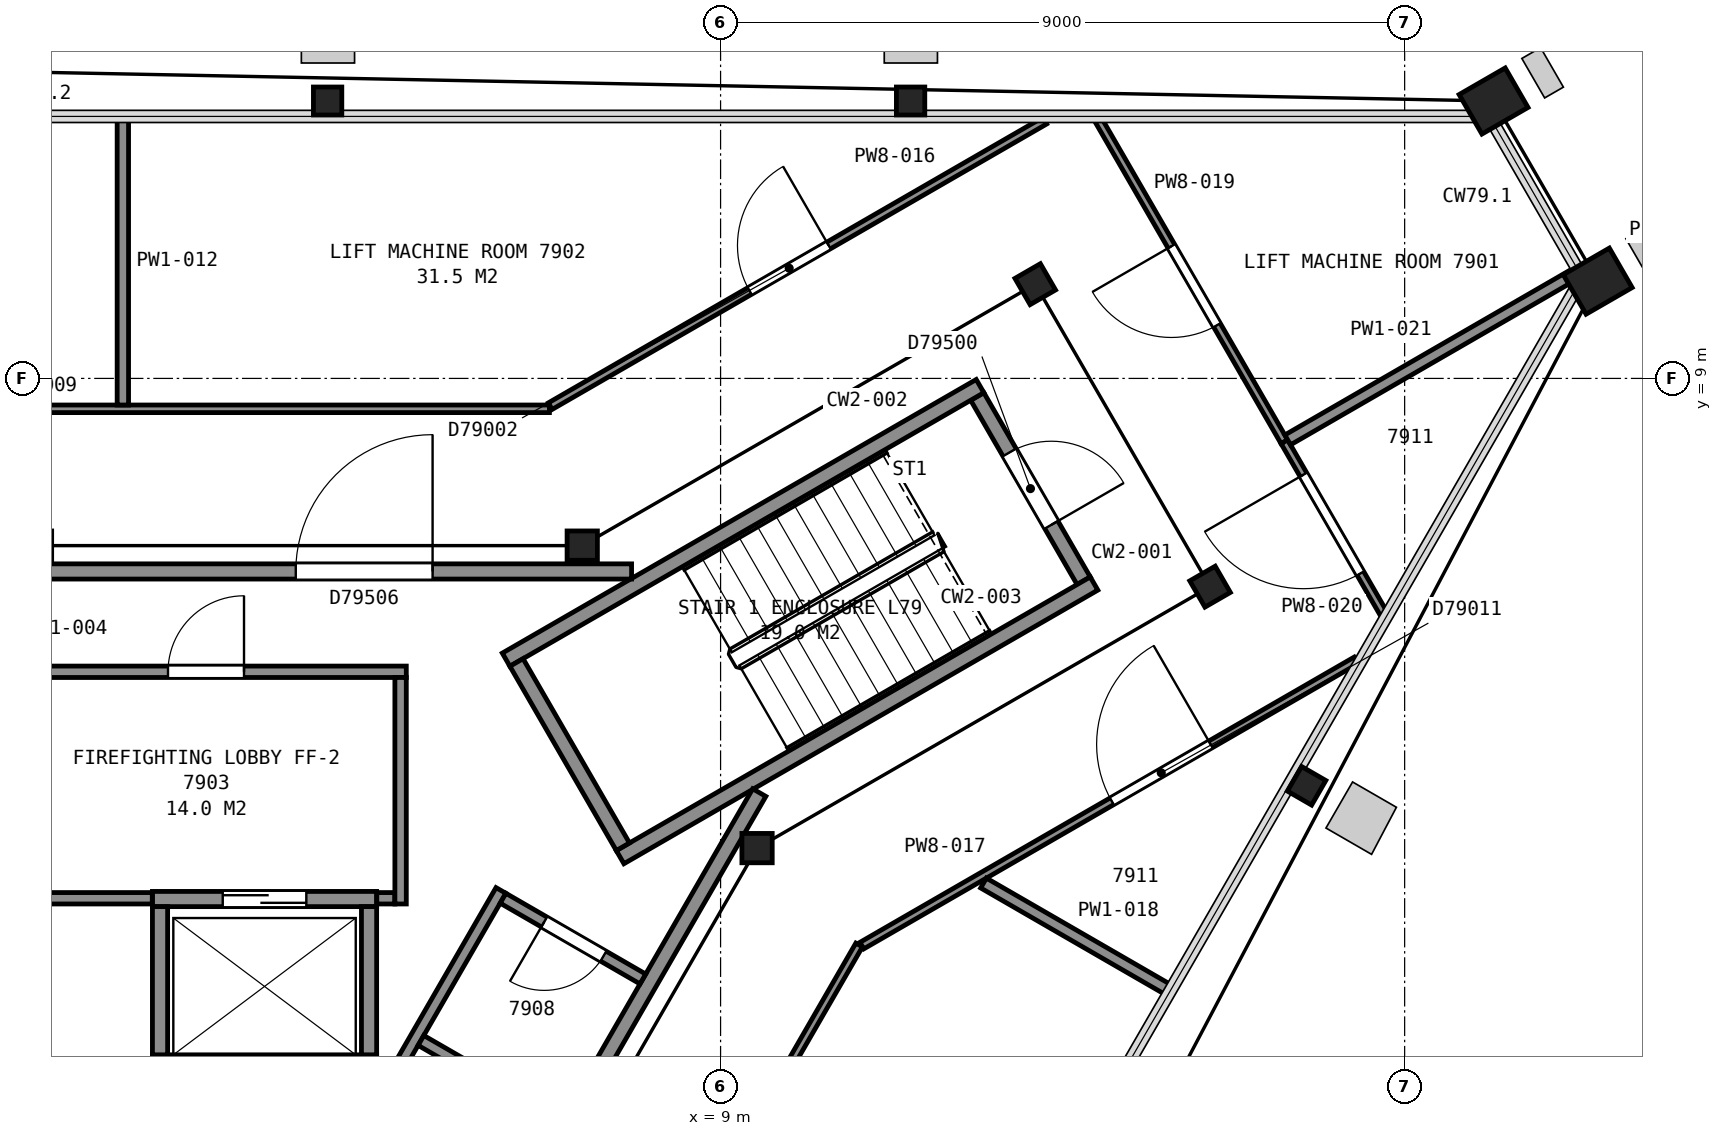
"""IFC4 building model, lengths in metres.
Left out: names, types, materials, properties, quantities, classifications, styles, units other than length and angle.
Written with IfcOpenShell. Run it as: python <this file> out.ifc"""

import sys

from ifc_helpers import new_model, si_unit, direction, frame, frame_2d, origin, origin_2d, place, context, subcontext, project, spatial, rectangle, hollow_rectangle, i_section, extrude, element, fill, save


model = new_model("IFC4")
c1 = context("Model", 3, precision=1e-05, world=origin(), true_north=direction((0.0, 1.0)))
c2 = subcontext(c1, "Body", "Model", "MODEL_VIEW")
j1 = project(units=[si_unit("LENGTHUNIT", "METRE"), si_unit("PLANEANGLEUNIT", "RADIAN")], contexts=[c1])
p1 = place(None, origin())
s1 = spatial("IfcSite", under=j1, at=p1, CompositionType="ELEMENT")
p2 = place(p1, origin())
s2 = spatial("IfcBuilding", under=s1, at=p2, CompositionType="ELEMENT")
p3 = place(p2, frame((0.0, 0.0, 312.6)))
s3 = spatial("IfcBuildingStorey", under=s2, at=p3, CompositionType="ELEMENT", Elevation=312.6)
p4 = place(p3, frame((19.17, 12.65, 0.0), z_axis=(0.0, 0.0, 1.0), x_axis=(0.5, -0.866025403784, 0.0)))
e1 = element("IfcColumn", 1, at=p4, inside=s3, PredefinedType="COLUMN", context=c2, shape_type="SweptSolid", body=[
    extrude(hollow_rectangle(XDim=0.6, YDim=0.7, WallThickness=0.04, at=origin_2d()), origin(), (0.0, 0.0, 1.0), 4.2),
])
for number, where, z_axis, x_axis in (
    (2, (11.5, 12.65, 0.0), (0.0, 0.0, 1.0), (1.0, 0.0, 0.0)),
    (3, (3.83, 12.65, 0.0), (0.0, 0.0, 1.0), (1.0, 0.0, 0.0)),
    (4, (16.71, 3.64, 0.0), (0.0, 0.0, 1.0), (-0.5, -0.866, 0.0)),
):
    element("IfcColumn", number, at=place(p3, frame(where, z_axis=z_axis, x_axis=x_axis)), inside=s3, PredefinedType="COLUMN", context=c2, shape_type="SweptSolid", body=[
        extrude(i_section(OverallWidth=0.373, OverallDepth=0.368, WebThickness=0.015, FlangeThickness=0.024, FilletRadius=0.015, at=origin_2d()), origin(), (0.0, 0.0, 1.0), 4.2),
    ])
p5 = place(p3, frame((20.54, 10.28, 0.0), z_axis=(0.0, 0.0, 1.0), x_axis=(0.5, -0.866025403784, 0.0)))
e5 = element("IfcColumn", 5, at=p5, inside=s3, PredefinedType="COLUMN", context=c2, shape_type="SweptSolid", body=[
    extrude(hollow_rectangle(XDim=0.6, YDim=0.7, WallThickness=0.04, at=origin_2d()), origin(), (0.0, 0.0, 1.0), 4.2),
])
for number, where, z_axis, x_axis in (
    (6, (9.48, 2.82, 0.0), (0.0, 0.0, 1.0), (1.0, 0.0, 0.0)),
    (7, (15.44, 6.26, 0.0), (0.0, 0.0, 1.0), (0.5, -0.866, 0.0)),
    (8, (13.14, 10.24, 0.0), (0.0, 0.0, 1.0), (0.5, -0.866, 0.0)),
    (9, (7.18, 6.8, 0.0), (0.0, 0.0, 1.0), (1.0, 0.0, 0.0)),
):
    element("IfcColumn", number, at=place(p3, frame(where, z_axis=z_axis, x_axis=x_axis)), inside=s3, PredefinedType="COLUMN", context=c2, shape_type="SweptSolid", body=[
        extrude(i_section(OverallWidth=0.399, OverallDepth=0.386, WebThickness=0.021, FlangeThickness=0.033, FilletRadius=0.015, at=origin_2d()), origin(), (0.0, 0.0, 1.0), 4.2),
    ])
p6 = place(p3, frame((13.777, 6.338, 0.0), z_axis=(0.0, 0.0, 1.0), x_axis=(-0.500049511043, 0.865996816683, 0.0)))
e10 = element("IfcWall", 10, at=p6, inside=s3, PredefinedType="PARTITIONING", context=c2, shape_type="SweptSolid", body=[
    extrude(rectangle(XDim=2.8, YDim=0.2, at=frame_2d((1.4, 0.0))), origin(), (0.0, 0.0, 1.0), 3.95),
])
p7 = place(p6, frame((0.85, 0.0, 0.0)))
e11 = element("IfcOpeningElement", 11, at=p7, cuts=e10, PredefinedType="OPENING", context=c2, shape_type="SweptSolid", body=[
    extrude(rectangle(XDim=1.1, YDim=2.1, at=frame_2d((0.55, 1.05))), frame((0.0, 0.11, 0.0), z_axis=(0.0, -1.0, 0.0), x_axis=(1.0, 0.0, 0.0)), (0.0, 0.0, 1.0), 0.22),
])
for number, where, z_axis, x_axis in (
    (12, (6.178, 5.299, 0.0), (0.0, 0.0, 1.0), (0.866, 0.5, 0.0)),
    (13, (7.678, 2.701, 0.0), (0.0, 0.0, 1.0), (0.866, 0.5, 0.0)),
):
    element("IfcWall", number, at=place(p3, frame(where, z_axis=z_axis, x_axis=x_axis)), inside=s3, PredefinedType="PARTITIONING", context=c2, shape_type="SweptSolid", body=[
        extrude(rectangle(XDim=7.2, YDim=0.2, at=frame_2d((3.6, 0.0))), origin(), (0.0, 0.0, 1.0), 3.95),
    ])
p8 = place(p3, frame((7.715, 2.838, 0.0), z_axis=(0.0, 0.0, 1.0), x_axis=(-0.500049511043, 0.865996816683, 0.0)))
e14 = element("IfcWall", 14, at=p8, inside=s3, PredefinedType="PARTITIONING", context=c2, shape_type="SweptSolid", body=[
    extrude(rectangle(XDim=2.8, YDim=0.2, at=frame_2d((1.4, 0.0))), origin(), (0.0, 0.0, 1.0), 3.95),
])
p9 = place(p3, frame((1.525, 0.0, 0.0), z_axis=(0.0, 0.0, 1.0), x_axis=(1.0, 0.0, 0.0)))
e15 = element("IfcWall", 15, at=p9, inside=s3, PredefinedType="PARTITIONING", context=c2, shape_type="SweptSolid", body=[
    extrude(rectangle(XDim=2.95, YDim=0.2, at=frame_2d((1.475, 0.0))), origin(), (0.0, 0.0, 1.0), 4.2),
])
p10 = place(p3, frame((1.525, 2.15, 0.0), z_axis=(0.0, 0.0, 1.0), x_axis=(1.0, 0.0, 0.0)))
e16 = element("IfcWall", 16, at=p10, inside=s3, PredefinedType="PARTITIONING", context=c2, shape_type="SweptSolid", body=[
    extrude(rectangle(XDim=2.95, YDim=0.2, at=frame_2d((1.475, 0.0))), origin(), (0.0, 0.0, 1.0), 4.2),
])
p11 = place(p10, frame((0.925, 0.0, 0.0)))
e17 = element("IfcOpeningElement", 17, at=p11, cuts=e16, PredefinedType="OPENING", context=c2, shape_type="SweptSolid", body=[
    extrude(rectangle(XDim=1.1, YDim=2.1, at=frame_2d((0.55, 1.05))), frame((0.0, 0.11, 0.0), z_axis=(0.0, -1.0, 0.0), x_axis=(1.0, 0.0, 0.0)), (0.0, 0.0, 1.0), 0.22),
])
for number, where, z_axis, x_axis in (
    (18, (4.375, 0.1, 0.0), (0.0, 0.0, 1.0), (0.0, 1.0, 0.0)),
    (19, (1.625, 0.1, 0.0), (0.0, 0.0, 1.0), (0.0, 1.0, 0.0)),
):
    element("IfcWall", number, at=place(p3, frame(where, z_axis=z_axis, x_axis=x_axis)), inside=s3, PredefinedType="PARTITIONING", context=c2, shape_type="SweptSolid", body=[
        extrude(rectangle(XDim=1.95, YDim=0.2, at=frame_2d((0.975, 0.0))), origin(), (0.0, 0.0, 1.0), 4.2),
    ])
p12 = place(p3, frame((7.829, 6.46, 0.0), z_axis=(0.0, 0.0, 1.0), x_axis=(-1.0, 0.0, 0.0)))
e20 = element("IfcWall", 20, at=p12, inside=s3, PredefinedType="PARTITIONING", context=c2, shape_type="SweptSolid", body=[
    extrude(rectangle(XDim=15.658, YDim=0.2, at=frame_2d((7.829, 0.0))), origin(), (0.0, 0.0, 1.0), 3.95),
])
p13 = place(p12, frame((2.618, 0.0, 0.0)))
e21 = element("IfcOpeningElement", 21, at=p13, cuts=e20, PredefinedType="OPENING", context=c2, shape_type="SweptSolid", body=[
    extrude(rectangle(XDim=1.8, YDim=2.1, at=frame_2d((0.9, 1.05))), frame((0.0, 0.11, 0.0), z_axis=(0.0, -1.0, 0.0), x_axis=(1.0, 0.0, 0.0)), (0.0, 0.0, 1.0), 0.22),
])
p14 = place(p3, frame((-0.245, 5.14, 0.0), z_axis=(0.0, 0.0, 1.0), x_axis=(1.0, 0.0, 0.0)))
e22 = element("IfcWall", 22, at=p14, inside=s3, PredefinedType="PARTITIONING", context=c2, shape_type="SweptSolid", body=[
    extrude(rectangle(XDim=5.11, YDim=0.15, at=frame_2d((2.555, 0.0))), origin(), (0.0, 0.0, 1.0), 3.95),
])
p15 = place(p14, frame((1.975, 0.0, 0.0)))
e23 = element("IfcOpeningElement", 23, at=p15, cuts=e22, PredefinedType="OPENING", context=c2, shape_type="SweptSolid", body=[
    extrude(rectangle(XDim=1.0, YDim=2.1, at=frame_2d((0.5, 1.05))), frame((0.0, 0.085, 0.0), z_axis=(0.0, -1.0, 0.0), x_axis=(1.0, 0.0, 0.0)), (0.0, 0.0, 1.0), 0.17),
])
p16 = place(p3, frame((0.167, 2.16, 0.0), z_axis=(0.0, 0.0, 1.0), x_axis=(1.0, 0.0, 0.0)))
e24 = element("IfcWall", 24, at=p16, inside=s3, PredefinedType="PARTITIONING", context=c2, shape_type="SweptSolid", body=[
    extrude(rectangle(XDim=1.356, YDim=0.15, at=frame_2d((0.678, 0.0))), origin(), (0.0, 0.0, 1.0), 3.95),
])
p17 = place(p3, frame((2.552, -8.5, 0.0), z_axis=(0.0, 0.0, 1.0), x_axis=(0.499981156672, 0.866036282712, 0.0)))
e25 = element("IfcWall", 25, at=p17, inside=s3, PredefinedType="PARTITIONING", context=c2, shape_type="SweptSolid", body=[
    extrude(rectangle(XDim=13.915, YDim=0.2, at=frame_2d((6.957, 0.0))), origin(), (0.0, 0.0, 1.0), 3.95),
])
p18 = place(p3, frame((6.111, 2.263, 0.0), z_axis=(0.0, 0.0, 1.0), x_axis=(-0.500011342071, -0.866018855338, 0.0)))
e26 = element("IfcWall", 26, at=p18, inside=s3, PredefinedType="PARTITIONING", context=c2, shape_type="SweptSolid", body=[
    extrude(rectangle(XDim=4.95, YDim=0.15, at=frame_2d((2.475, 0.0))), origin(), (0.0, 0.0, 1.0), 3.95),
])
p19 = place(p18, frame((3.275, 0.0, 0.0)))
e27 = element("IfcOpeningElement", 27, at=p19, cuts=e26, PredefinedType="OPENING", context=c2, shape_type="SweptSolid", body=[
    extrude(rectangle(XDim=0.9, YDim=2.1, at=frame_2d((0.45, 1.05))), frame((0.0, 0.085, 0.0), z_axis=(0.0, -1.0, 0.0), x_axis=(1.0, 0.0, 0.0)), (0.0, 0.0, 1.0), 0.17),
])
p20 = place(p3, frame((4.477, 2.16, 0.0), z_axis=(0.0, 0.0, 1.0), x_axis=(1.0, 0.0, 0.0)))
e28 = element("IfcWall", 28, at=p20, inside=s3, PredefinedType="PARTITIONING", context=c2, shape_type="SweptSolid", body=[
    extrude(rectangle(XDim=0.238, YDim=0.15, at=frame_2d((0.119, 0.0))), origin(), (0.0, 0.0, 1.0), 3.95),
])
p21 = place(p3, frame((4.79, 2.085, 0.0), z_axis=(0.0, 0.0, 1.0), x_axis=(0.0, 1.0, 0.0)))
e29 = element("IfcWall", 29, at=p21, inside=s3, PredefinedType="PARTITIONING", context=c2, shape_type="SweptSolid", body=[
    extrude(rectangle(XDim=2.98, YDim=0.15, at=frame_2d((1.49, 0.0))), origin(), (0.0, 0.0, 1.0), 3.95),
])
p22 = place(p3, frame((5.058, 0.29, 0.0), z_axis=(0.0, 0.0, 1.0), x_axis=(0.866141567767, -0.499798744081, 0.0)))
e30 = element("IfcWall", 30, at=p22, inside=s3, PredefinedType="PARTITIONING", context=c2, shape_type="SweptSolid", body=[
    extrude(rectangle(XDim=2.124, YDim=0.15, at=frame_2d((1.062, 0.0))), origin(), (0.0, 0.0, 1.0), 3.95),
])
p23 = place(p3, frame((7.977, 1.098, 0.0), z_axis=(0.0, 0.0, 1.0), x_axis=(-0.865913749133, 0.500193341681, 0.0)))
e31 = element("IfcWall", 31, at=p23, inside=s3, PredefinedType="PARTITIONING", context=c2, shape_type="SweptSolid", body=[
    extrude(rectangle(XDim=2.124, YDim=0.15, at=frame_2d((1.062, 0.0))), origin(), (0.0, 0.0, 1.0), 3.95),
])
p24 = place(p23, frame((0.599, 0.0, 0.0)))
e32 = element("IfcOpeningElement", 32, at=p24, cuts=e31, PredefinedType="OPENING", context=c2, shape_type="SweptSolid", body=[
    extrude(rectangle(XDim=0.9, YDim=2.1, at=frame_2d((0.45, 1.05))), frame((0.0, 0.085, 0.0), z_axis=(0.0, -1.0, 0.0), x_axis=(1.0, 0.0, 0.0)), (0.0, 0.0, 1.0), 0.17),
])
p25 = place(p3, frame((-6.748, 8.6, 0.0), z_axis=(0.0, 0.0, 1.0), x_axis=(1.0, 0.0, 0.0)))
e33 = element("IfcWall", 33, at=p25, inside=s3, PredefinedType="PARTITIONING", context=c2, shape_type="SweptSolid", body=[
    extrude(rectangle(XDim=13.496, YDim=0.1, at=frame_2d((6.748, 0.0))), origin(), (0.0, 0.0, 1.0), 3.297),
])
p26 = place(p3, frame((1.136, 8.65, 0.0), z_axis=(0.0, 0.0, 1.0), x_axis=(0.0, 1.0, 0.0)))
e34 = element("IfcWall", 34, at=p26, inside=s3, PredefinedType="PARTITIONING", context=c2, shape_type="SweptSolid", body=[
    extrude(rectangle(XDim=3.783, YDim=0.15, at=frame_2d((1.892, 0.0))), origin(), (0.0, 0.0, 1.0), 3.297),
])
p27 = place(p3, frame((10.823, 1.545, 0.0), z_axis=(0.0, 0.0, 1.0), x_axis=(-0.499912942625, -0.866075660549, 0.0)))
e35 = element("IfcWall", 35, at=p27, inside=s3, PredefinedType="PARTITIONING", context=c2, shape_type="SweptSolid", body=[
    extrude(rectangle(XDim=13.499, YDim=0.1, at=frame_2d((6.749, 0.0))), origin(), (0.0, 0.0, 1.0), 3.297),
])
p28 = place(p27, frame((3.88, 0.0, 0.0)))
e36 = element("IfcOpeningElement", 36, at=p28, cuts=e35, PredefinedType="OPENING", context=c2, shape_type="SweptSolid", body=[
    extrude(rectangle(XDim=1.5, YDim=2.1, at=frame_2d((0.75, 1.05))), frame((0.0, 0.06, 0.0), z_axis=(0.0, -1.0, 0.0), x_axis=(1.0, 0.0, 0.0)), (0.0, 0.0, 1.0), 0.12),
])
p29 = place(p3, frame((6.759, 8.635, 0.0), z_axis=(0.0, 0.0, 1.0), x_axis=(0.866073029218, 0.499917501255, 0.0)))
e37 = element("IfcWall", 37, at=p29, inside=s3, PredefinedType="PARTITIONING", context=c2, shape_type="SweptSolid", body=[
    extrude(rectangle(XDim=7.512, YDim=0.1, at=frame_2d((3.756, 0.0))), origin(), (0.0, 0.0, 1.0), 3.297),
])
p30 = place(p29, frame((3.03, 0.0, 0.0)))
e38 = element("IfcOpeningElement", 38, at=p30, cuts=e37, PredefinedType="OPENING", context=c2, shape_type="SweptSolid", body=[
    extrude(rectangle(XDim=1.2, YDim=2.1, at=frame_2d((0.6, 1.05))), frame((0.0, 0.06, 0.0), z_axis=(0.0, -1.0, 0.0), x_axis=(1.0, 0.0, 0.0)), (0.0, 0.0, 1.0), 0.12),
])
p31 = place(p3, frame((17.361, 5.29, 0.0), z_axis=(0.0, 0.0, 1.0), x_axis=(-0.866105995393, -0.499860385252, 0.0)))
e39 = element("IfcWall", 39, at=p31, inside=s3, PredefinedType="PARTITIONING", context=c2, shape_type="SweptSolid", body=[
    extrude(rectangle(XDim=7.508, YDim=0.1, at=frame_2d((3.754, 0.0))), origin(), (0.0, 0.0, 1.0), 3.297),
])
p32 = place(p31, frame((2.21, 0.0, 0.0)))
e40 = element("IfcOpeningElement", 40, at=p32, cuts=e39, PredefinedType="OPENING", context=c2, shape_type="SweptSolid", body=[
    extrude(rectangle(XDim=1.5, YDim=2.1, at=frame_2d((0.75, 1.05))), frame((0.0, 0.06, 0.0), z_axis=(0.0, -1.0, 0.0), x_axis=(1.0, 0.0, 0.0)), (0.0, 0.0, 1.0), 0.12),
])
p33 = place(p3, frame((12.459, 2.36, 0.0), z_axis=(0.0, 0.0, 1.0), x_axis=(0.865988260476, -0.50006432858, 0.0)))
e41 = element("IfcWall", 41, at=p33, inside=s3, PredefinedType="PARTITIONING", context=c2, shape_type="SweptSolid", body=[
    extrude(rectangle(XDim=2.823, YDim=0.15, at=frame_2d((1.412, 0.0))), origin(), (0.0, 0.0, 1.0), 3.297),
])
p34 = place(p3, frame((13.966, 12.408, 0.0), z_axis=(0.0, 0.0, 1.0), x_axis=(0.500399645014, -0.865794545646, 0.0)))
e42 = element("IfcWall", 42, at=p34, inside=s3, PredefinedType="PARTITIONING", context=c2, shape_type="SweptSolid", body=[
    extrude(rectangle(XDim=4.899, YDim=0.1, at=frame_2d((2.449, 0.0))), origin(), (0.0, 0.0, 1.0), 3.297),
])
p35 = place(p34, frame((1.929, 0.0, 0.0)))
e43 = element("IfcOpeningElement", 43, at=p35, cuts=e42, PredefinedType="OPENING", context=c2, shape_type="SweptSolid", body=[
    extrude(rectangle(XDim=1.2, YDim=2.1, at=frame_2d((0.6, 1.05))), frame((0.0, 0.06, 0.0), z_axis=(0.0, -1.0, 0.0), x_axis=(1.0, 0.0, 0.0)), (0.0, 0.0, 1.0), 0.12),
])
p36 = place(p3, frame((16.418, 8.166, 0.0), z_axis=(0.0, 0.0, 1.0), x_axis=(0.500141194934, -0.865943869503, 0.0)))
e44 = element("IfcWall", 44, at=p36, inside=s3, PredefinedType="PARTITIONING", context=c2, shape_type="SweptSolid", body=[
    extrude(rectangle(XDim=2.624, YDim=0.1, at=frame_2d((1.312, 0.0))), origin(), (0.0, 0.0, 1.0), 3.297),
])
p37 = place(p36, frame((0.5, 0.0, 0.0)))
e45 = element("IfcOpeningElement", 45, at=p37, cuts=e44, PredefinedType="OPENING", context=c2, shape_type="SweptSolid", body=[
    extrude(rectangle(XDim=1.5, YDim=2.1, at=frame_2d((0.75, 1.05))), frame((0.0, 0.06, 0.0), z_axis=(0.0, -1.0, 0.0), x_axis=(1.0, 0.0, 0.0)), (0.0, 0.0, 1.0), 0.12),
])
p38 = place(p3, frame((16.461, 8.191, 0.0), z_axis=(0.0, 0.0, 1.0), x_axis=(0.865849090599, 0.500305259125, 0.0)))
e46 = element("IfcWall", 46, at=p38, inside=s3, PredefinedType="PARTITIONING", context=c2, shape_type="SweptSolid", body=[
    extrude(rectangle(XDim=4.411, YDim=0.15, at=frame_2d((2.206, 0.0))), origin(), (0.0, 0.0, 1.0), 3.297),
])
p39 = place(p7, origin())
e47 = element("IfcDoor", 47, at=p39, inside=s3, OperationType="SINGLE_SWING_LEFT", PredefinedType="DOOR", context=c2, shape_type="SweptSolid", body=[
    extrude(rectangle(XDim=1.1, YDim=2.1, at=frame_2d((0.55, 1.05))), frame((0.0, 0.025, 0.0), z_axis=(0.0, -1.0, 0.0), x_axis=(1.0, 0.0, 0.0)), (0.0, 0.0, 1.0), 0.05),
])
fill(e11, e47)
p40 = place(p11, origin())
e48 = element("IfcDoor", 48, at=p40, inside=s3, OperationType="SLIDING_TO_RIGHT", PredefinedType="DOOR", context=c2, shape_type="SweptSolid", body=[
    extrude(rectangle(XDim=1.1, YDim=2.1, at=frame_2d((0.55, 1.05))), frame((0.0, 0.025, 0.0), z_axis=(0.0, -1.0, 0.0), x_axis=(1.0, 0.0, 0.0)), (0.0, 0.0, 1.0), 0.05),
])
fill(e17, e48)
p41 = place(p13, origin())
e49 = element("IfcDoor", 49, at=p41, inside=s3, OperationType="DOUBLE_DOOR_SINGLE_SWING", PredefinedType="DOOR", context=c2, shape_type="SweptSolid", body=[
    extrude(rectangle(XDim=1.8, YDim=2.1, at=frame_2d((0.9, 1.05))), frame((0.0, 0.025, 0.0), z_axis=(0.0, -1.0, 0.0), x_axis=(1.0, 0.0, 0.0)), (0.0, 0.0, 1.0), 0.05),
])
fill(e21, e49)
p42 = place(p15, origin())
e50 = element("IfcDoor", 50, at=p42, inside=s3, OperationType="SINGLE_SWING_RIGHT", PredefinedType="DOOR", context=c2, shape_type="SweptSolid", body=[
    extrude(rectangle(XDim=1.0, YDim=2.1, at=frame_2d((0.5, 1.05))), frame((0.0, 0.025, 0.0), z_axis=(0.0, -1.0, 0.0), x_axis=(1.0, 0.0, 0.0)), (0.0, 0.0, 1.0), 0.05),
])
fill(e23, e50)
p43 = place(p24, origin())
e51 = element("IfcDoor", 51, at=p43, inside=s3, OperationType="SINGLE_SWING_RIGHT", PredefinedType="DOOR", context=c2, shape_type="SweptSolid", body=[
    extrude(rectangle(XDim=0.9, YDim=2.1, at=frame_2d((0.45, 1.05))), frame((0.0, 0.025, 0.0), z_axis=(0.0, -1.0, 0.0), x_axis=(1.0, 0.0, 0.0)), (0.0, 0.0, 1.0), 0.05),
])
fill(e32, e51)
p44 = place(p30, origin())
e52 = element("IfcDoor", 52, at=p44, inside=s3, OperationType="SINGLE_SWING_RIGHT", PredefinedType="DOOR", context=c2, shape_type="SweptSolid", body=[
    extrude(rectangle(XDim=1.2, YDim=2.1, at=frame_2d((0.6, 1.05))), frame((0.0, 0.025, 0.0), z_axis=(0.0, -1.0, 0.0), x_axis=(1.0, 0.0, 0.0)), (0.0, 0.0, 1.0), 0.05),
])
fill(e38, e52)
p45 = place(p32, origin())
e53 = element("IfcDoor", 53, at=p45, inside=s3, OperationType="DOUBLE_DOOR_SINGLE_SWING", PredefinedType="DOOR", context=c2, shape_type="SweptSolid", body=[
    extrude(rectangle(XDim=1.5, YDim=2.1, at=frame_2d((0.75, 1.05))), frame((0.0, 0.025, 0.0), z_axis=(0.0, -1.0, 0.0), x_axis=(1.0, 0.0, 0.0)), (0.0, 0.0, 1.0), 0.05),
])
fill(e40, e53)
p46 = place(p35, origin())
e54 = element("IfcDoor", 54, at=p46, inside=s3, OperationType="SINGLE_SWING_LEFT", PredefinedType="DOOR", context=c2, shape_type="SweptSolid", body=[
    extrude(rectangle(XDim=1.2, YDim=2.1, at=frame_2d((0.6, 1.05))), frame((0.0, 0.025, 0.0), z_axis=(0.0, -1.0, 0.0), x_axis=(1.0, 0.0, 0.0)), (0.0, 0.0, 1.0), 0.05),
])
fill(e43, e54)
p47 = place(p37, origin())
e55 = element("IfcDoor", 55, at=p47, inside=s3, OperationType="DOUBLE_DOOR_SINGLE_SWING", PredefinedType="DOOR", context=c2, shape_type="SweptSolid", body=[
    extrude(rectangle(XDim=1.5, YDim=2.1, at=frame_2d((0.75, 1.05))), frame((0.0, 0.025, 0.0), z_axis=(0.0, -1.0, 0.0), x_axis=(1.0, 0.0, 0.0)), (0.0, 0.0, 1.0), 0.05),
])
fill(e45, e55)
save(model, sys.argv[1])
